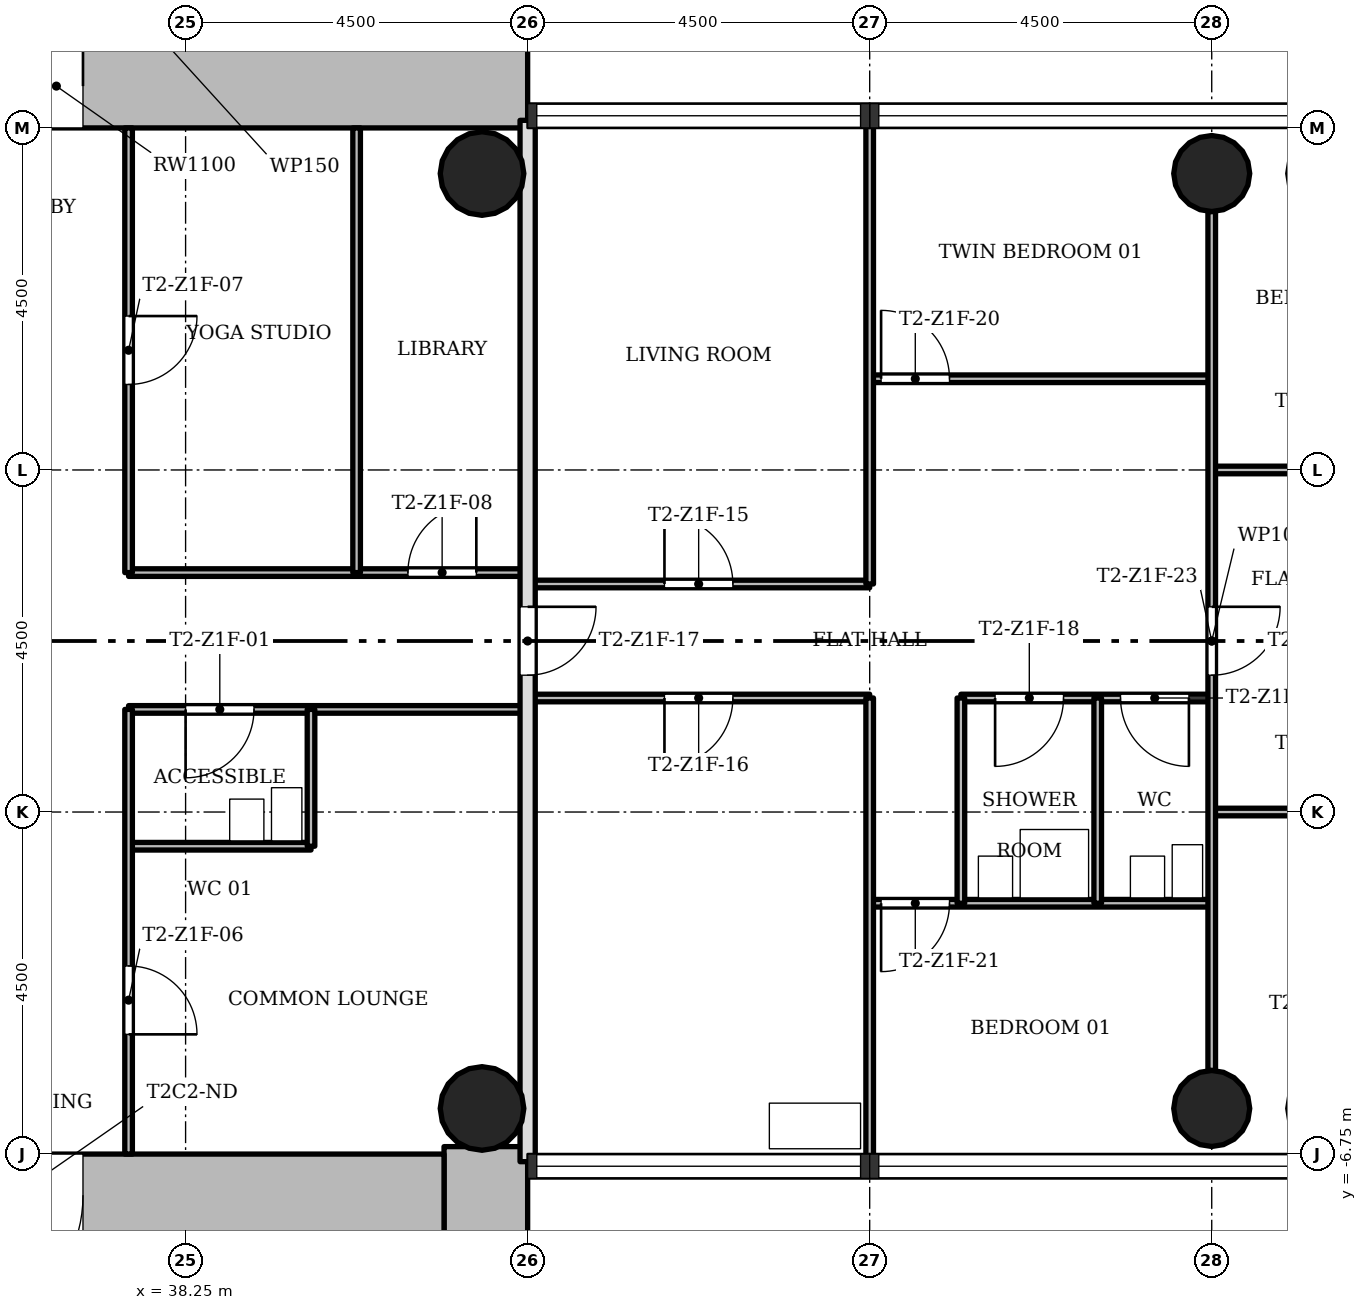
"""IFC4 building model, lengths in metres.
Left out: names, types, materials, properties, quantities, classifications, styles, units other than length and angle.
Written with IfcOpenShell. Run it as: python <this file> out.ifc"""

import sys

from ifc_helpers import new_model, si_unit, direction, frame, frame_2d, origin, origin_2d, place, context, subcontext, project, spatial, rectangle, hollow_circle, extrude, element, fill, save


model = new_model("IFC4")
c1 = context("Model", 3, precision=1e-05, world=origin(), true_north=direction((0.0, 1.0)))
c2 = subcontext(c1, "Body", "Model", "MODEL_VIEW")
j1 = project(units=[si_unit("LENGTHUNIT", "METRE"), si_unit("PLANEANGLEUNIT", "RADIAN")], contexts=[c1])
p1 = place(None, origin())
s1 = spatial("IfcSite", under=j1, at=p1, CompositionType="ELEMENT")
p2 = place(p1, origin())
s2 = spatial("IfcBuilding", under=s1, at=p2, CompositionType="ELEMENT")
p3 = place(p2, frame((0.0, 0.0, 68.7)))
s3 = spatial("IfcBuildingStorey", under=s2, at=p3, CompositionType="ELEMENT", Elevation=68.7)
p4 = place(p3, frame((30.35, 7.3, 0.0), z_axis=(0.0, 0.0, 1.0), x_axis=(1.0, 0.0, 0.0)))
e1 = element("IfcWall", 1, at=p4, inside=s3, PredefinedType="SHEAR", context=c2, shape_type="SweptSolid", body=[
    extrude(rectangle(XDim=12.4, YDim=1.1, at=frame_2d((6.2, 0.0))), origin(), (0.0, 0.0, 1.0), 3.4),
])
p5 = place(p4, frame((4.75, 0.0, 0.0)))
e2 = element("IfcOpeningElement", 2, at=p5, cuts=e1, PredefinedType="OPENING", context=c2, shape_type="SweptSolid", body=[
    extrude(rectangle(XDim=1.8, YDim=2.1, at=frame_2d((0.9, 1.05))), frame((0.0, 0.56, 0.0), z_axis=(0.0, -1.0, 0.0), x_axis=(1.0, 0.0, 0.0)), (0.0, 0.0, 1.0), 1.12),
])
p6 = place(p3, frame((42.2, -15.248, 0.0), z_axis=(0.0, 0.0, 1.0), x_axis=(0.0, 1.0, 0.0)))
e3 = element("IfcWall", 3, at=p6, inside=s3, PredefinedType="SHEAR", context=c2, shape_type="SweptSolid", body=[
    extrude(rectangle(XDim=8.596, YDim=1.1, at=frame_2d((4.298, 0.0))), origin(), (0.0, 0.0, 1.0), 3.4),
])
p7 = place(p3, frame((41.65, -7.3, 0.0), z_axis=(0.0, 0.0, 1.0), x_axis=(-1.0, 0.0, 0.0)))
e4 = element("IfcWall", 4, at=p7, inside=s3, PredefinedType="SHEAR", context=c2, shape_type="SweptSolid", body=[
    extrude(rectangle(XDim=12.4, YDim=1.1, at=frame_2d((6.2, 0.0))), origin(), (0.0, 0.0, 1.0), 3.4),
])
p8 = place(p7, frame((4.75, 0.0, 0.0)))
e5 = element("IfcOpeningElement", 5, at=p8, cuts=e4, PredefinedType="OPENING", context=c2, shape_type="SweptSolid", body=[
    extrude(rectangle(XDim=1.8, YDim=2.1, at=frame_2d((0.9, 1.05))), frame((0.0, 0.56, 0.0), z_axis=(0.0, -1.0, 0.0), x_axis=(1.0, 0.0, 0.0)), (0.0, 0.0, 1.0), 1.12),
])
for number, where, z_axis, x_axis in (
    (6, (51.75, -6.15, 0.0), (0.0, 0.0, 1.0), (1.0, 0.0, 0.0)),
    (7, (51.75, 6.15, 0.0), (0.0, 0.0, 1.0), (1.0, 0.0, 0.0)),
):
    element("IfcColumn", number, at=place(p3, frame(where, z_axis=z_axis, x_axis=x_axis)), inside=s3, PredefinedType="COLUMN", context=c2, shape_type="SweptSolid", body=[
        extrude(hollow_circle(Radius=0.5, WallThickness=0.036, at=origin_2d()), origin(), (0.0, 0.0, 1.0), 3.4),
    ])
for number, where, z_axis, x_axis in (
    (8, (42.15, -6.15, 0.0), (0.0, 0.0, 1.0), (1.0, 0.0, 0.0)),
    (9, (42.15, 6.15, 0.0), (0.0, 0.0, 1.0), (1.0, 0.0, 0.0)),
):
    element("IfcColumn", number, at=place(p3, frame(where, z_axis=z_axis, x_axis=x_axis)), inside=s3, PredefinedType="COLUMN", context=c2, shape_type="SweptSolid", body=[
        extrude(hollow_circle(Radius=0.55, WallThickness=0.04, at=origin_2d()), origin(), (0.0, 0.0, 1.0), 3.4),
    ])
p9 = place(p3, frame((51.75, -3.45, 0.0), z_axis=(0.0, 0.0, 1.0), x_axis=(-1.0, 0.0, 0.0)))
e10 = element("IfcWall", 10, at=p9, inside=s3, PredefinedType="PARTITIONING", context=c2, shape_type="SweptSolid", body=[
    extrude(rectangle(XDim=4.5, YDim=0.1, at=frame_2d((2.25, 0.0))), origin(), (0.0, 0.0, 1.0), 3.0),
])
p10 = place(p9, frame((3.45, 0.0, 0.0)))
e11 = element("IfcOpeningElement", 11, at=p10, cuts=e10, PredefinedType="OPENING", context=c2, shape_type="SweptSolid", body=[
    extrude(rectangle(XDim=0.9, YDim=2.1, at=frame_2d((0.45, 1.05))), frame((0.0, 0.06, 0.0), z_axis=(0.0, -1.0, 0.0), x_axis=(1.0, 0.0, 0.0)), (0.0, 0.0, 1.0), 0.12),
])
p11 = place(p3, frame((39.9, -2.7, 0.0), z_axis=(0.0, 0.0, 1.0), x_axis=(-1.0, 0.0, 0.0)))
e12 = element("IfcWall", 12, at=p11, inside=s3, PredefinedType="PARTITIONING", context=c2, shape_type="SweptSolid", body=[
    extrude(rectangle(XDim=2.4, YDim=0.1, at=frame_2d((1.2, 0.0))), origin(), (0.0, 0.0, 1.0), 3.0),
])
p12 = place(p3, frame((56.35, -2.25, 0.0), z_axis=(0.0, 0.0, 1.0), x_axis=(-1.0, 0.0, 0.0)))
e13 = element("IfcWall", 13, at=p12, inside=s3, PredefinedType="PARTITIONING", context=c2, shape_type="SweptSolid", body=[
    extrude(rectangle(XDim=4.6, YDim=0.1, at=frame_2d((2.3, 0.0))), origin(), (0.0, 0.0, 1.0), 3.0),
])
p13 = place(p12, frame((2.65, 0.0, 0.0)))
e14 = element("IfcOpeningElement", 14, at=p13, cuts=e13, PredefinedType="OPENING", context=c2, shape_type="SweptSolid", body=[
    extrude(rectangle(XDim=0.9, YDim=2.1, at=frame_2d((0.45, 1.05))), frame((0.0, 0.06, 0.0), z_axis=(0.0, -1.0, 0.0), x_axis=(1.0, 0.0, 0.0)), (0.0, 0.0, 1.0), 0.12),
])
p14 = place(p3, frame((42.75, -0.9, 0.0), z_axis=(0.0, 0.0, 1.0), x_axis=(-1.0, 0.0, 0.0)))
e15 = element("IfcWall", 15, at=p14, inside=s3, PredefinedType="PARTITIONING", context=c2, shape_type="SweptSolid", body=[
    extrude(rectangle(XDim=5.25, YDim=0.1, at=frame_2d((2.625, 0.0))), origin(), (0.0, 0.0, 1.0), 3.0),
])
p15 = place(p14, frame((3.6, 0.0, 0.0)))
e16 = element("IfcOpeningElement", 16, at=p15, cuts=e15, PredefinedType="OPENING", context=c2, shape_type="SweptSolid", body=[
    extrude(rectangle(XDim=0.9, YDim=2.1, at=frame_2d((0.45, 1.05))), frame((0.0, 0.06, 0.0), z_axis=(0.0, -1.0, 0.0), x_axis=(1.0, 0.0, 0.0)), (0.0, 0.0, 1.0), 0.12),
])
p16 = place(p3, frame((51.75, -0.75, 0.0), z_axis=(0.0, 0.0, 1.0), x_axis=(-1.0, 0.0, 0.0)))
e17 = element("IfcWall", 17, at=p16, inside=s3, PredefinedType="PARTITIONING", context=c2, shape_type="SweptSolid", body=[
    extrude(rectangle(XDim=3.3, YDim=0.1, at=frame_2d((1.65, 0.0))), origin(), (0.0, 0.0, 1.0), 3.0),
])
p17 = place(p16, frame((1.95, 0.0, 0.0)))
e18 = element("IfcOpeningElement", 18, at=p17, cuts=e17, PredefinedType="OPENING", context=c2, shape_type="SweptSolid", body=[
    extrude(rectangle(XDim=0.9, YDim=2.1, at=frame_2d((0.45, 1.05))), frame((0.0, 0.06, 0.0), z_axis=(0.0, -1.0, 0.0), x_axis=(1.0, 0.0, 0.0)), (0.0, 0.0, 1.0), 0.12),
])
p18 = place(p16, frame((0.3, 0.0, 0.0)))
e19 = element("IfcOpeningElement", 19, at=p18, cuts=e17, PredefinedType="OPENING", context=c2, shape_type="SweptSolid", body=[
    extrude(rectangle(XDim=0.9, YDim=2.1, at=frame_2d((0.45, 1.05))), frame((0.0, 0.06, 0.0), z_axis=(0.0, -1.0, 0.0), x_axis=(1.0, 0.0, 0.0)), (0.0, 0.0, 1.0), 0.12),
])
p19 = place(p3, frame((47.25, -0.75, 0.0), z_axis=(0.0, 0.0, 1.0), x_axis=(-1.0, 0.0, 0.0)))
e20 = element("IfcWall", 20, at=p19, inside=s3, PredefinedType="PARTITIONING", context=c2, shape_type="SweptSolid", body=[
    extrude(rectangle(XDim=4.5, YDim=0.1, at=frame_2d((2.25, 0.0))), origin(), (0.0, 0.0, 1.0), 3.0),
])
p20 = place(p19, frame((1.8, 0.0, 0.0)))
e21 = element("IfcOpeningElement", 21, at=p20, cuts=e20, PredefinedType="OPENING", context=c2, shape_type="SweptSolid", body=[
    extrude(rectangle(XDim=0.9, YDim=2.1, at=frame_2d((0.45, 1.05))), frame((0.0, 0.06, 0.0), z_axis=(0.0, -1.0, 0.0), x_axis=(1.0, 0.0, 0.0)), (0.0, 0.0, 1.0), 0.12),
])
p21 = place(p3, frame((47.25, 0.75, 0.0), z_axis=(0.0, 0.0, 1.0), x_axis=(-1.0, 0.0, 0.0)))
e22 = element("IfcWall", 22, at=p21, inside=s3, PredefinedType="PARTITIONING", context=c2, shape_type="SweptSolid", body=[
    extrude(rectangle(XDim=4.5, YDim=0.1, at=frame_2d((2.25, 0.0))), origin(), (0.0, 0.0, 1.0), 3.0),
])
p22 = place(p21, frame((1.8, 0.0, 0.0)))
e23 = element("IfcOpeningElement", 23, at=p22, cuts=e22, PredefinedType="OPENING", context=c2, shape_type="SweptSolid", body=[
    extrude(rectangle(XDim=0.9, YDim=2.1, at=frame_2d((0.45, 1.05))), frame((0.0, 0.06, 0.0), z_axis=(0.0, -1.0, 0.0), x_axis=(1.0, 0.0, 0.0)), (0.0, 0.0, 1.0), 0.12),
])
p23 = place(p3, frame((42.75, 0.9, 0.0), z_axis=(0.0, 0.0, 1.0), x_axis=(-1.0, 0.0, 0.0)))
e24 = element("IfcWall", 24, at=p23, inside=s3, PredefinedType="PARTITIONING", context=c2, shape_type="SweptSolid", body=[
    extrude(rectangle(XDim=5.25, YDim=0.1, at=frame_2d((2.625, 0.0))), origin(), (0.0, 0.0, 1.0), 3.0),
])
p24 = place(p23, frame((0.675, 0.0, 0.0)))
e25 = element("IfcOpeningElement", 25, at=p24, cuts=e24, PredefinedType="OPENING", context=c2, shape_type="SweptSolid", body=[
    extrude(rectangle(XDim=0.9, YDim=2.1, at=frame_2d((0.45, 1.05))), frame((0.0, 0.06, 0.0), z_axis=(0.0, -1.0, 0.0), x_axis=(1.0, 0.0, 0.0)), (0.0, 0.0, 1.0), 0.12),
])
p25 = place(p3, frame((56.35, 2.25, 0.0), z_axis=(0.0, 0.0, 1.0), x_axis=(-1.0, 0.0, 0.0)))
e26 = element("IfcWall", 26, at=p25, inside=s3, PredefinedType="PARTITIONING", context=c2, shape_type="SweptSolid", body=[
    extrude(rectangle(XDim=4.6, YDim=0.1, at=frame_2d((2.3, 0.0))), origin(), (0.0, 0.0, 1.0), 3.0),
])
p26 = place(p25, frame((2.65, 0.0, 0.0)))
e27 = element("IfcOpeningElement", 27, at=p26, cuts=e26, PredefinedType="OPENING", context=c2, shape_type="SweptSolid", body=[
    extrude(rectangle(XDim=0.9, YDim=2.1, at=frame_2d((0.45, 1.05))), frame((0.0, 0.06, 0.0), z_axis=(0.0, -1.0, 0.0), x_axis=(1.0, 0.0, 0.0)), (0.0, 0.0, 1.0), 0.12),
])
p27 = place(p3, frame((51.75, 3.45, 0.0), z_axis=(0.0, 0.0, 1.0), x_axis=(-1.0, 0.0, 0.0)))
e28 = element("IfcWall", 28, at=p27, inside=s3, PredefinedType="PARTITIONING", context=c2, shape_type="SweptSolid", body=[
    extrude(rectangle(XDim=4.5, YDim=0.1, at=frame_2d((2.25, 0.0))), origin(), (0.0, 0.0, 1.0), 3.0),
])
p28 = place(p27, frame((3.45, 0.0, 0.0)))
e29 = element("IfcOpeningElement", 29, at=p28, cuts=e28, PredefinedType="OPENING", context=c2, shape_type="SweptSolid", body=[
    extrude(rectangle(XDim=0.9, YDim=2.1, at=frame_2d((0.45, 1.05))), frame((0.0, 0.06, 0.0), z_axis=(0.0, -1.0, 0.0), x_axis=(1.0, 0.0, 0.0)), (0.0, 0.0, 1.0), 0.12),
])
p29 = place(p3, frame((51.75, -5.65, 0.0), z_axis=(0.0, 0.0, 1.0), x_axis=(0.0, 1.0, 0.0)))
e30 = element("IfcWall", 30, at=p29, inside=s3, PredefinedType="PARTITIONING", context=c2, shape_type="SweptSolid", body=[
    extrude(rectangle(XDim=11.3, YDim=0.1, at=frame_2d((5.65, 0.0))), origin(), (0.0, 0.0, 1.0), 3.0),
])
p30 = place(p29, frame((5.2, 0.0, 0.0)))
e31 = element("IfcOpeningElement", 31, at=p30, cuts=e30, PredefinedType="OPENING", context=c2, shape_type="SweptSolid", body=[
    extrude(rectangle(XDim=0.9, YDim=2.1, at=frame_2d((0.45, 1.05))), frame((0.0, 0.06, 0.0), z_axis=(0.0, -1.0, 0.0), x_axis=(1.0, 0.0, 0.0)), (0.0, 0.0, 1.0), 0.12),
])
for number, where, z_axis, x_axis in (
    (32, (50.25, -3.45, 0.0), (0.0, 0.0, 1.0), (0.0, 1.0, 0.0)),
    (33, (48.45, -3.45, 0.0), (0.0, 0.0, 1.0), (0.0, 1.0, 0.0)),
):
    element("IfcWall", number, at=place(p3, frame(where, z_axis=z_axis, x_axis=x_axis)), inside=s3, PredefinedType="PARTITIONING", context=c2, shape_type="SweptSolid", body=[
        extrude(rectangle(XDim=2.7, YDim=0.1, at=frame_2d((1.35, 0.0))), origin(), (0.0, 0.0, 1.0), 3.0),
    ])
for number, where, z_axis, x_axis in (
    (34, (47.25, -6.85, 0.0), (0.0, 0.0, 1.0), (0.0, 1.0, 0.0)),
    (35, (47.25, 0.75, 0.0), (0.0, 0.0, 1.0), (0.0, 1.0, 0.0)),
):
    element("IfcWall", number, at=place(p3, frame(where, z_axis=z_axis, x_axis=x_axis)), inside=s3, PredefinedType="PARTITIONING", context=c2, shape_type="SweptSolid", body=[
        extrude(rectangle(XDim=6.1, YDim=0.1, at=frame_2d((3.05, 0.0))), origin(), (0.0, 0.0, 1.0), 3.0),
    ])
p31 = place(p3, frame((42.75, -6.85, 0.0), z_axis=(0.0, 0.0, 1.0), x_axis=(0.0, 1.0, 0.0)))
e36 = element("IfcWall", 36, at=p31, inside=s3, PredefinedType="SOLIDWALL", context=c2, shape_type="SweptSolid", body=[
    extrude(rectangle(XDim=13.7, YDim=0.2, at=frame_2d((6.85, 0.0))), origin(), (0.0, 0.0, 1.0), 3.0),
])
p32 = place(p31, frame((6.4, 0.0, 0.0)))
e37 = element("IfcOpeningElement", 37, at=p32, cuts=e36, PredefinedType="OPENING", context=c2, shape_type="SweptSolid", body=[
    extrude(rectangle(XDim=0.9, YDim=2.1, at=frame_2d((0.45, 1.05))), frame((0.0, 0.11, 0.0), z_axis=(0.0, -1.0, 0.0), x_axis=(1.0, 0.0, 0.0)), (0.0, 0.0, 1.0), 0.22),
])
p33 = place(p3, frame((40.5, 0.9, 0.0), z_axis=(0.0, 0.0, 1.0), x_axis=(0.0, 1.0, 0.0)))
e38 = element("IfcWall", 38, at=p33, inside=s3, PredefinedType="PARTITIONING", context=c2, shape_type="SweptSolid", body=[
    extrude(rectangle(XDim=5.85, YDim=0.1, at=frame_2d((2.925, 0.0))), origin(), (0.0, 0.0, 1.0), 3.0),
])
p34 = place(p3, frame((39.9, -2.7, 0.0), z_axis=(0.0, 0.0, 1.0), x_axis=(0.0, 1.0, 0.0)))
e39 = element("IfcWall", 39, at=p34, inside=s3, PredefinedType="PARTITIONING", context=c2, shape_type="SweptSolid", body=[
    extrude(rectangle(XDim=1.8, YDim=0.1, at=frame_2d((0.9, 0.0))), origin(), (0.0, 0.0, 1.0), 3.0),
])
p35 = place(p3, frame((37.5, -6.75, 0.0), z_axis=(0.0, 0.0, 1.0), x_axis=(0.0, 1.0, 0.0)))
e40 = element("IfcWall", 40, at=p35, inside=s3, PredefinedType="PARTITIONING", context=c2, shape_type="SweptSolid", body=[
    extrude(rectangle(XDim=5.85, YDim=0.1, at=frame_2d((2.925, 0.0))), origin(), (0.0, 0.0, 1.0), 3.0),
])
p36 = place(p35, frame((1.575, 0.0, 0.0)))
e41 = element("IfcOpeningElement", 41, at=p36, cuts=e40, PredefinedType="OPENING", context=c2, shape_type="SweptSolid", body=[
    extrude(rectangle(XDim=0.9, YDim=2.1, at=frame_2d((0.45, 1.05))), frame((0.0, 0.06, 0.0), z_axis=(0.0, -1.0, 0.0), x_axis=(1.0, 0.0, 0.0)), (0.0, 0.0, 1.0), 0.12),
])
p37 = place(p3, frame((37.5, 0.9, 0.0), z_axis=(0.0, 0.0, 1.0), x_axis=(0.0, 1.0, 0.0)))
e42 = element("IfcWall", 42, at=p37, inside=s3, PredefinedType="PARTITIONING", context=c2, shape_type="SweptSolid", body=[
    extrude(rectangle(XDim=5.85, YDim=0.1, at=frame_2d((2.925, 0.0))), origin(), (0.0, 0.0, 1.0), 3.0),
])
p38 = place(p37, frame((2.475, 0.0, 0.0)))
e43 = element("IfcOpeningElement", 43, at=p38, cuts=e42, PredefinedType="OPENING", context=c2, shape_type="SweptSolid", body=[
    extrude(rectangle(XDim=0.9, YDim=2.1, at=frame_2d((0.45, 1.05))), frame((0.0, 0.06, 0.0), z_axis=(0.0, -1.0, 0.0), x_axis=(1.0, 0.0, 0.0)), (0.0, 0.0, 1.0), 0.12),
])
p39 = place(p15, origin())
e44 = element("IfcDoor", 44, at=p39, inside=s3, OperationType="SINGLE_SWING_LEFT", PredefinedType="DOOR", context=c2, shape_type="SweptSolid", body=[
    extrude(rectangle(XDim=0.9, YDim=2.1, at=frame_2d((0.45, 1.05))), frame((0.0, 0.025, 0.0), z_axis=(0.0, -1.0, 0.0), x_axis=(1.0, 0.0, 0.0)), (0.0, 0.0, 1.0), 0.05),
])
fill(e16, e44)
p40 = place(p36, origin())
e45 = element("IfcDoor", 45, at=p40, inside=s3, OperationType="SINGLE_SWING_LEFT", PredefinedType="DOOR", context=c2, shape_type="SweptSolid", body=[
    extrude(rectangle(XDim=0.9, YDim=2.1, at=frame_2d((0.45, 1.05))), frame((0.0, 0.025, 0.0), z_axis=(0.0, -1.0, 0.0), x_axis=(1.0, 0.0, 0.0)), (0.0, 0.0, 1.0), 0.05),
])
fill(e41, e45)
p41 = place(p38, origin())
e46 = element("IfcDoor", 46, at=p41, inside=s3, OperationType="SINGLE_SWING_RIGHT", PredefinedType="DOOR", context=c2, shape_type="SweptSolid", body=[
    extrude(rectangle(XDim=0.9, YDim=2.1, at=frame_2d((0.45, 1.05))), frame((0.0, 0.025, 0.0), z_axis=(0.0, -1.0, 0.0), x_axis=(1.0, 0.0, 0.0)), (0.0, 0.0, 1.0), 0.05),
])
fill(e43, e46)
p42 = place(p24, origin())
e47 = element("IfcDoor", 47, at=p42, inside=s3, OperationType="SINGLE_SWING_LEFT", PredefinedType="DOOR", context=c2, shape_type="SweptSolid", body=[
    extrude(rectangle(XDim=0.9, YDim=2.1, at=frame_2d((0.45, 1.05))), frame((0.0, 0.025, 0.0), z_axis=(0.0, -1.0, 0.0), x_axis=(1.0, 0.0, 0.0)), (0.0, 0.0, 1.0), 0.05),
])
fill(e25, e47)
p43 = place(p22, origin())
e48 = element("IfcDoor", 48, at=p43, inside=s3, OperationType="SINGLE_SWING_RIGHT", PredefinedType="DOOR", context=c2, shape_type="SweptSolid", body=[
    extrude(rectangle(XDim=0.9, YDim=2.1, at=frame_2d((0.45, 1.05))), frame((0.0, 0.025, 0.0), z_axis=(0.0, -1.0, 0.0), x_axis=(1.0, 0.0, 0.0)), (0.0, 0.0, 1.0), 0.05),
])
fill(e23, e48)
p44 = place(p20, origin())
e49 = element("IfcDoor", 49, at=p44, inside=s3, OperationType="SINGLE_SWING_LEFT", PredefinedType="DOOR", context=c2, shape_type="SweptSolid", body=[
    extrude(rectangle(XDim=0.9, YDim=2.1, at=frame_2d((0.45, 1.05))), frame((0.0, 0.025, 0.0), z_axis=(0.0, -1.0, 0.0), x_axis=(1.0, 0.0, 0.0)), (0.0, 0.0, 1.0), 0.05),
])
fill(e21, e49)
p45 = place(p32, origin())
e50 = element("IfcDoor", 50, at=p45, inside=s3, OperationType="SINGLE_SWING_RIGHT", PredefinedType="DOOR", context=c2, shape_type="SweptSolid", body=[
    extrude(rectangle(XDim=0.9, YDim=2.1, at=frame_2d((0.45, 1.05))), frame((0.0, 0.025, 0.0), z_axis=(0.0, -1.0, 0.0), x_axis=(1.0, 0.0, 0.0)), (0.0, 0.0, 1.0), 0.05),
])
fill(e37, e50)
p46 = place(p17, origin())
e51 = element("IfcDoor", 51, at=p46, inside=s3, OperationType="SINGLE_SWING_LEFT", PredefinedType="DOOR", context=c2, shape_type="SweptSolid", body=[
    extrude(rectangle(XDim=0.9, YDim=2.1, at=frame_2d((0.45, 1.05))), frame((0.0, 0.025, 0.0), z_axis=(0.0, -1.0, 0.0), x_axis=(1.0, 0.0, 0.0)), (0.0, 0.0, 1.0), 0.05),
])
fill(e18, e51)
p47 = place(p18, origin())
e52 = element("IfcDoor", 52, at=p47, inside=s3, OperationType="SINGLE_SWING_RIGHT", PredefinedType="DOOR", context=c2, shape_type="SweptSolid", body=[
    extrude(rectangle(XDim=0.9, YDim=2.1, at=frame_2d((0.45, 1.05))), frame((0.0, 0.025, 0.0), z_axis=(0.0, -1.0, 0.0), x_axis=(1.0, 0.0, 0.0)), (0.0, 0.0, 1.0), 0.05),
])
fill(e19, e52)
p48 = place(p28, origin())
e53 = element("IfcDoor", 53, at=p48, inside=s3, OperationType="SINGLE_SWING_RIGHT", PredefinedType="DOOR", context=c2, shape_type="SweptSolid", body=[
    extrude(rectangle(XDim=0.9, YDim=2.1, at=frame_2d((0.45, 1.05))), frame((0.0, 0.025, 0.0), z_axis=(0.0, -1.0, 0.0), x_axis=(1.0, 0.0, 0.0)), (0.0, 0.0, 1.0), 0.05),
])
fill(e29, e53)
p49 = place(p10, origin())
e54 = element("IfcDoor", 54, at=p49, inside=s3, OperationType="SINGLE_SWING_LEFT", PredefinedType="DOOR", context=c2, shape_type="SweptSolid", body=[
    extrude(rectangle(XDim=0.9, YDim=2.1, at=frame_2d((0.45, 1.05))), frame((0.0, 0.025, 0.0), z_axis=(0.0, -1.0, 0.0), x_axis=(1.0, 0.0, 0.0)), (0.0, 0.0, 1.0), 0.05),
])
fill(e11, e54)
p50 = place(p30, origin())
e55 = element("IfcDoor", 55, at=p50, inside=s3, OperationType="SINGLE_SWING_RIGHT", PredefinedType="DOOR", context=c2, shape_type="SweptSolid", body=[
    extrude(rectangle(XDim=0.9, YDim=2.1, at=frame_2d((0.45, 1.05))), frame((0.0, 0.025, 0.0), z_axis=(0.0, -1.0, 0.0), x_axis=(1.0, 0.0, 0.0)), (0.0, 0.0, 1.0), 0.05),
])
fill(e31, e55)
p51 = place(p5, origin())
e56 = element("IfcDoor", 56, at=p51, inside=s3, OperationType="SINGLE_SWING_LEFT", PredefinedType="DOOR", context=c2, shape_type="SweptSolid", body=[
    extrude(rectangle(XDim=1.8, YDim=2.1, at=frame_2d((0.9, 1.05))), frame((0.0, 0.025, 0.0), z_axis=(0.0, -1.0, 0.0), x_axis=(1.0, 0.0, 0.0)), (0.0, 0.0, 1.0), 0.05),
])
fill(e2, e56)
p52 = place(p8, origin())
e57 = element("IfcDoor", 57, at=p52, inside=s3, OperationType="SINGLE_SWING_LEFT", PredefinedType="DOOR", context=c2, shape_type="SweptSolid", body=[
    extrude(rectangle(XDim=1.8, YDim=2.1, at=frame_2d((0.9, 1.05))), frame((0.0, 0.025, 0.0), z_axis=(0.0, -1.0, 0.0), x_axis=(1.0, 0.0, 0.0)), (0.0, 0.0, 1.0), 0.05),
])
fill(e5, e57)
save(model, sys.argv[1])
